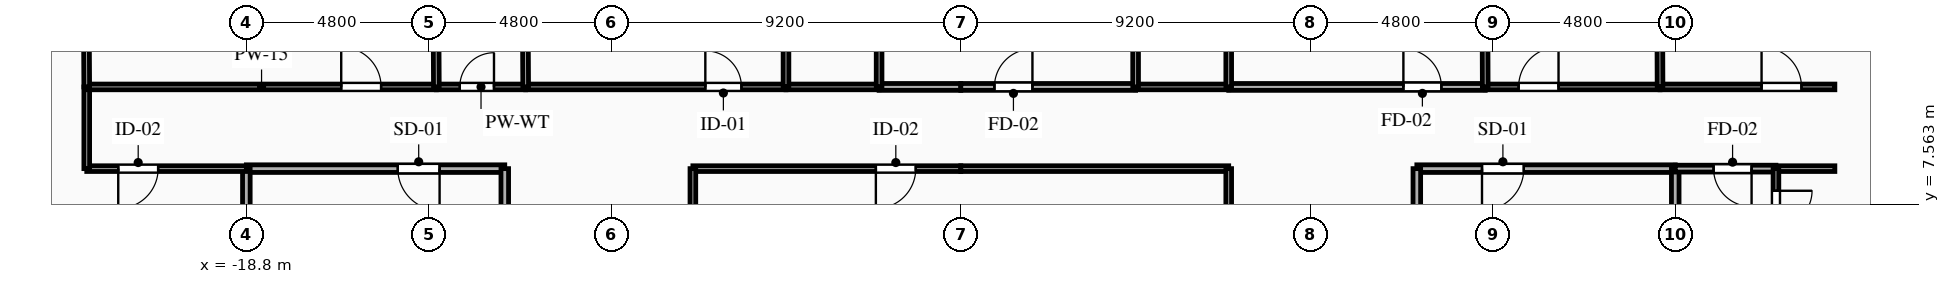
"""IFC4 building model, lengths in metres.
Left out: names, types, materials, properties, quantities, classifications, styles, units other than length and angle.
Written with IfcOpenShell. Run it as: python <this file> out.ifc"""

import sys

from ifc_helpers import new_model, si_unit, direction, frame, frame_2d, origin, place, context, subcontext, project, spatial, rectangle, extrude, element, fill, save


model = new_model("IFC4")
c1 = context("Model", 3, precision=1e-05, world=origin(), true_north=direction((0.0, 1.0)))
c2 = subcontext(c1, "Body", "Model", "MODEL_VIEW")
j1 = project(units=[si_unit("LENGTHUNIT", "METRE"), si_unit("PLANEANGLEUNIT", "RADIAN")], contexts=[c1])
p1 = place(None, origin())
s1 = spatial("IfcSite", under=j1, at=p1, CompositionType="ELEMENT")
p2 = place(p1, origin())
s2 = spatial("IfcBuilding", under=s1, at=p2, CompositionType="ELEMENT")
p3 = place(p2, frame((0.0, 0.0, 79.0)))
s3 = spatial("IfcBuildingStorey", under=s2, at=p3, CompositionType="ELEMENT", Elevation=79.0)
p4 = place(p3, frame((-12.0, 8.5, 0.0), z_axis=(0.0, 0.0, 1.0), x_axis=(-1.0, 0.0, 0.0)))
e1 = element("IfcWall", 1, at=p4, inside=s3, PredefinedType="PARTITIONING", context=c2, shape_type="SweptSolid", body=[
    extrude(rectangle(XDim=6.8, YDim=0.2, at=frame_2d((3.4, 0.0))), origin(), (0.0, 0.0, 1.0), 3.045),
])
p5 = place(p4, frame((1.715, 0.0, 0.0)))
e2 = element("IfcOpeningElement", 2, at=p5, cuts=e1, PredefinedType="OPENING", context=c2, shape_type="SweptSolid", body=[
    extrude(rectangle(XDim=1.1, YDim=2.15, at=frame_2d((0.55, 1.075))), frame((0.0, 0.11, 0.0), z_axis=(0.0, -1.0, 0.0), x_axis=(1.0, 0.0, 0.0)), (0.0, 0.0, 1.0), 0.22),
])
p6 = place(p3, frame((-12.0, 5.6, 0.0), z_axis=(0.0, 0.0, 1.0), x_axis=(0.0, 1.0, 0.0)))
e3 = element("IfcWall", 3, at=p6, inside=s3, PredefinedType="PARTITIONING", context=c2, shape_type="SweptSolid", body=[
    extrude(rectangle(XDim=2.9, YDim=0.2, at=frame_2d((1.45, 0.0))), origin(), (0.0, 0.0, 1.0), 3.045),
])
p7 = place(p3, frame((-18.8, 8.5, 0.0), z_axis=(0.0, 0.0, 1.0), x_axis=(0.0, -1.0, 0.0)))
e4 = element("IfcWall", 4, at=p7, inside=s3, PredefinedType="PARTITIONING", context=c2, shape_type="SweptSolid", body=[
    extrude(rectangle(XDim=2.9, YDim=0.2, at=frame_2d((1.45, 0.0))), origin(), (0.0, 0.0, 1.0), 2.53),
])
p8 = place(p3, frame((18.8, 8.5, 0.0), z_axis=(0.0, 0.0, 1.0), x_axis=(-1.0, 0.0, 0.0)))
e5 = element("IfcWall", 5, at=p8, inside=s3, PredefinedType="PARTITIONING", context=c2, shape_type="SweptSolid", body=[
    extrude(rectangle(XDim=6.8, YDim=0.2, at=frame_2d((3.4, 0.0))), origin(), (0.0, 0.0, 1.0), 3.045),
])
p9 = place(p8, frame((3.985, 0.0, 0.0)))
e6 = element("IfcOpeningElement", 6, at=p9, cuts=e5, PredefinedType="OPENING", context=c2, shape_type="SweptSolid", body=[
    extrude(rectangle(XDim=1.1, YDim=2.15, at=frame_2d((0.55, 1.075))), frame((0.0, 0.11, 0.0), z_axis=(0.0, -1.0, 0.0), x_axis=(1.0, 0.0, 0.0)), (0.0, 0.0, 1.0), 0.22),
])
p10 = place(p3, frame((12.0, 8.5, 0.0), z_axis=(0.0, 0.0, 1.0), x_axis=(0.0, -1.0, 0.0)))
e7 = element("IfcWall", 7, at=p10, inside=s3, PredefinedType="PARTITIONING", context=c2, shape_type="SweptSolid", body=[
    extrude(rectangle(XDim=2.9, YDim=0.2, at=frame_2d((1.45, 0.0))), origin(), (0.0, 0.0, 1.0), 3.045),
])
p11 = place(p3, frame((18.8, 5.6, 0.0), z_axis=(0.0, 0.0, 1.0), x_axis=(0.0, 1.0, 0.0)))
e8 = element("IfcWall", 8, at=p11, inside=s3, PredefinedType="PARTITIONING", context=c2, shape_type="SweptSolid", body=[
    extrude(rectangle(XDim=2.9, YDim=0.2, at=frame_2d((1.45, 0.0))), origin(), (0.0, 0.0, 1.0), 2.53),
])
p12 = place(p3, frame((-18.8, 8.5, 0.0), z_axis=(0.0, 0.0, 1.0), x_axis=(-1.0, 0.0, 0.0)))
e9 = element("IfcWall", 9, at=p12, inside=s3, PredefinedType="PARTITIONING", context=c2, shape_type="SweptSolid", body=[
    extrude(rectangle(XDim=4.2, YDim=0.15, at=frame_2d((2.1, 0.0))), origin(), (0.0, 0.0, 1.0), 3.045),
])
p13 = place(p12, frame((2.321, 0.0, 0.0)))
e10 = element("IfcOpeningElement", 10, at=p13, cuts=e9, PredefinedType="OPENING", context=c2, shape_type="SweptSolid", body=[
    extrude(rectangle(XDim=1.05, YDim=2.15, at=frame_2d((0.525, 1.075))), frame((0.0, 0.085, 0.0), z_axis=(0.0, -1.0, 0.0), x_axis=(1.0, 0.0, 0.0)), (0.0, 0.0, 1.0), 0.17),
])
p14 = place(p3, frame((-23.0, 8.5, 0.0), z_axis=(0.0, 0.0, 1.0), x_axis=(0.0, 1.0, 0.0)))
e11 = element("IfcWall", 11, at=p14, inside=s3, PredefinedType="PARTITIONING", context=c2, shape_type="SweptSolid", body=[
    extrude(rectangle(XDim=2.15, YDim=0.15, at=frame_2d((1.075, 0.0))), origin(), (0.0, 0.0, 1.0), 3.045),
])
p15 = place(p3, frame((-23.0, 10.65, 0.0), z_axis=(0.0, 0.0, 1.0), x_axis=(1.0, 0.0, 0.0)))
e12 = element("IfcWall", 12, at=p15, inside=s3, PredefinedType="PARTITIONING", context=c2, shape_type="SweptSolid", body=[
    extrude(rectangle(XDim=9.2, YDim=0.15, at=frame_2d((4.6, 0.0))), origin(), (0.0, 0.0, 1.0), 3.045),
])
p16 = place(p15, frame((6.696, 0.0, 0.0)))
e13 = element("IfcOpeningElement", 13, at=p16, cuts=e12, PredefinedType="OPENING", context=c2, shape_type="SweptSolid", body=[
    extrude(rectangle(XDim=1.05, YDim=2.15, at=frame_2d((0.525, 1.075))), frame((0.0, 0.085, 0.0), z_axis=(0.0, -1.0, 0.0), x_axis=(1.0, 0.0, 0.0)), (0.0, 0.0, 1.0), 0.17),
])
p17 = place(p3, frame((-13.8, 10.65, 0.0), z_axis=(0.0, 0.0, 1.0), x_axis=(1.0, 0.0, 0.0)))
e14 = element("IfcWall", 14, at=p17, inside=s3, PredefinedType="PLUMBINGWALL", context=c2, shape_type="SweptSolid", body=[
    extrude(rectangle(XDim=2.35, YDim=0.15, at=frame_2d((1.175, 0.0))), origin(), (0.0, 0.0, 1.0), 3.045),
])
p18 = place(p17, frame((0.616, 0.0, 0.0)))
e15 = element("IfcOpeningElement", 15, at=p18, cuts=e14, PredefinedType="OPENING", context=c2, shape_type="SweptSolid", body=[
    extrude(rectangle(XDim=0.9, YDim=2.1, at=frame_2d((0.45, 1.05))), frame((0.0, 0.085, 0.0), z_axis=(0.0, -1.0, 0.0), x_axis=(1.0, 0.0, 0.0)), (0.0, 0.0, 1.0), 0.17),
])
p19 = place(p3, frame((-11.45, 10.65, 0.0), z_axis=(0.0, 0.0, 1.0), x_axis=(1.0, 0.0, 0.0)))
e16 = element("IfcWall", 16, at=p19, inside=s3, PredefinedType="PARTITIONING", context=c2, shape_type="SweptSolid", body=[
    extrude(rectangle(XDim=6.85, YDim=0.15, at=frame_2d((3.425, 0.0))), origin(), (0.0, 0.0, 1.0), 3.045),
])
p20 = place(p19, frame((4.728, 0.0, 0.0)))
e17 = element("IfcOpeningElement", 17, at=p20, cuts=e16, PredefinedType="OPENING", context=c2, shape_type="SweptSolid", body=[
    extrude(rectangle(XDim=0.95, YDim=2.1, at=frame_2d((0.475, 1.05))), frame((0.0, 0.085, 0.0), z_axis=(0.0, -1.0, 0.0), x_axis=(1.0, 0.0, 0.0)), (0.0, 0.0, 1.0), 0.17),
])
p21 = place(p3, frame((-2.15, 10.65, 0.0), z_axis=(0.0, 0.0, 1.0), x_axis=(1.0, 0.0, 0.0)))
e18 = element("IfcWall", 18, at=p21, inside=s3, PredefinedType="PARTITIONING", context=c2, shape_type="SweptSolid", body=[
    extrude(rectangle(XDim=2.15, YDim=0.18, at=frame_2d((1.075, 0.0))), origin(), (0.0, 0.0, 1.0), 3.045),
])
p22 = place(p3, frame((-4.6, 10.65, 0.0), z_axis=(0.0, 0.0, 1.0), x_axis=(1.0, 0.0, 0.0)))
e19 = element("IfcWall", 19, at=p22, inside=s3, PredefinedType="PLUMBINGWALL", context=c2, shape_type="SweptSolid", body=[
    extrude(rectangle(XDim=2.45, YDim=0.15, at=frame_2d((1.225, 0.0))), origin(), (0.0, 0.0, 1.0), 3.045),
])
p23 = place(p3, frame((0.0, 8.5, 0.0), z_axis=(0.0, 0.0, 1.0), x_axis=(-1.0, 0.0, 0.0)))
e20 = element("IfcWall", 20, at=p23, inside=s3, PredefinedType="PARTITIONING", context=c2, shape_type="SweptSolid", body=[
    extrude(rectangle(XDim=7.05, YDim=0.15, at=frame_2d((3.525, 0.0))), origin(), (0.0, 0.0, 1.0), 3.045),
])
p24 = place(p23, frame((1.185, 0.0, 0.0)))
e21 = element("IfcOpeningElement", 21, at=p24, cuts=e20, PredefinedType="OPENING", context=c2, shape_type="SweptSolid", body=[
    extrude(rectangle(XDim=1.05, YDim=2.15, at=frame_2d((0.525, 1.075))), frame((0.0, 0.085, 0.0), z_axis=(0.0, -1.0, 0.0), x_axis=(1.0, 0.0, 0.0)), (0.0, 0.0, 1.0), 0.17),
])
p25 = place(p3, frame((21.45, 8.5, 0.0), z_axis=(0.0, 0.0, 1.0), x_axis=(-1.0, 0.0, 0.0)))
e22 = element("IfcWall", 22, at=p25, inside=s3, PredefinedType="PARTITIONING", context=c2, shape_type="SweptSolid", body=[
    extrude(rectangle(XDim=2.65, YDim=0.18, at=frame_2d((1.325, 0.0))), origin(), (0.0, 0.0, 1.0), 3.045),
])
p26 = place(p25, frame((0.641, 0.0, 0.0)))
e23 = element("IfcOpeningElement", 23, at=p26, cuts=e22, PredefinedType="OPENING", context=c2, shape_type="SweptSolid", body=[
    extrude(rectangle(XDim=1.0, YDim=2.15, at=frame_2d((0.5, 1.075))), frame((0.0, 0.1, 0.0), z_axis=(0.0, -1.0, 0.0), x_axis=(1.0, 0.0, 0.0)), (0.0, 0.0, 1.0), 0.2),
])
p27 = place(p3, frame((23.0, 8.5, 0.0), z_axis=(0.0, 0.0, 1.0), x_axis=(-1.0, 0.0, 0.0)))
e24 = element("IfcWall", 24, at=p27, inside=s3, PredefinedType="PARTITIONING", context=c2, shape_type="SweptSolid", body=[
    extrude(rectangle(XDim=1.55, YDim=0.15, at=frame_2d((0.775, 0.0))), origin(), (0.0, 0.0, 1.0), 3.045),
])
p28 = place(p3, frame((0.0, 10.65, 0.0), z_axis=(0.0, 0.0, 1.0), x_axis=(1.0, 0.0, 0.0)))
e25 = element("IfcWall", 25, at=p28, inside=s3, PredefinedType="PARTITIONING", context=c2, shape_type="SweptSolid", body=[
    extrude(rectangle(XDim=4.6, YDim=0.18, at=frame_2d((2.3, 0.0))), origin(), (0.0, 0.0, 1.0), 3.045),
])
p29 = place(p28, frame((0.885, 0.0, 0.0)))
e26 = element("IfcOpeningElement", 26, at=p29, cuts=e25, PredefinedType="OPENING", context=c2, shape_type="SweptSolid", body=[
    extrude(rectangle(XDim=1.0, YDim=2.15, at=frame_2d((0.5, 1.075))), frame((0.0, 0.1, 0.0), z_axis=(0.0, -1.0, 0.0), x_axis=(1.0, 0.0, 0.0)), (0.0, 0.0, 1.0), 0.2),
])
p30 = place(p3, frame((7.05, 10.65, 0.0), z_axis=(0.0, 0.0, 1.0), x_axis=(1.0, 0.0, 0.0)))
e27 = element("IfcWall", 27, at=p30, inside=s3, PredefinedType="PARTITIONING", context=c2, shape_type="SweptSolid", body=[
    extrude(rectangle(XDim=6.75, YDim=0.18, at=frame_2d((3.375, 0.0))), origin(), (0.0, 0.0, 1.0), 3.045),
])
p31 = place(p30, frame((4.596, 0.0, 0.0)))
e28 = element("IfcOpeningElement", 28, at=p31, cuts=e27, PredefinedType="OPENING", context=c2, shape_type="SweptSolid", body=[
    extrude(rectangle(XDim=1.0, YDim=2.15, at=frame_2d((0.5, 1.075))), frame((0.0, 0.1, 0.0), z_axis=(0.0, -1.0, 0.0), x_axis=(1.0, 0.0, 0.0)), (0.0, 0.0, 1.0), 0.2),
])
p32 = place(p3, frame((4.6, 10.65, 0.0), z_axis=(0.0, 0.0, 1.0), x_axis=(1.0, 0.0, 0.0)))
e29 = element("IfcWall", 29, at=p32, inside=s3, PredefinedType="PLUMBINGWALL", context=c2, shape_type="SweptSolid", body=[
    extrude(rectangle(XDim=2.45, YDim=0.15, at=frame_2d((1.225, 0.0))), origin(), (0.0, 0.0, 1.0), 3.045),
])
p33 = place(p3, frame((13.8, 10.65, 0.0), z_axis=(0.0, 0.0, 1.0), x_axis=(1.0, 0.0, 0.0)))
e30 = element("IfcWall", 30, at=p33, inside=s3, PredefinedType="PARTITIONING", context=c2, shape_type="SweptSolid", body=[
    extrude(rectangle(XDim=4.6, YDim=0.15, at=frame_2d((2.3, 0.0))), origin(), (0.0, 0.0, 1.0), 3.045),
])
p34 = place(p33, frame((0.879, 0.0, 0.0)))
e31 = element("IfcOpeningElement", 31, at=p34, cuts=e30, PredefinedType="OPENING", context=c2, shape_type="SweptSolid", body=[
    extrude(rectangle(XDim=1.05, YDim=2.15, at=frame_2d((0.525, 1.075))), frame((0.0, 0.085, 0.0), z_axis=(0.0, -1.0, 0.0), x_axis=(1.0, 0.0, 0.0)), (0.0, 0.0, 1.0), 0.17),
])
p35 = place(p3, frame((18.4, 10.65, 0.0), z_axis=(0.0, 0.0, 1.0), x_axis=(1.0, 0.0, 0.0)))
e32 = element("IfcWall", 32, at=p35, inside=s3, PredefinedType="PARTITIONING", context=c2, shape_type="SweptSolid", body=[
    extrude(rectangle(XDim=4.6, YDim=0.15, at=frame_2d((2.3, 0.0))), origin(), (0.0, 0.0, 1.0), 3.045),
])
p36 = place(p35, frame((2.671, 0.0, 0.0)))
e33 = element("IfcOpeningElement", 33, at=p36, cuts=e32, PredefinedType="OPENING", context=c2, shape_type="SweptSolid", body=[
    extrude(rectangle(XDim=1.05, YDim=2.15, at=frame_2d((0.525, 1.075))), frame((0.0, 0.085, 0.0), z_axis=(0.0, -1.0, 0.0), x_axis=(1.0, 0.0, 0.0)), (0.0, 0.0, 1.0), 0.17),
])
for number, where, z_axis, x_axis in (
    (34, (7.05, 8.5, 0.0), (0.0, 0.0, 1.0), (-1.0, 0.0, 0.0)),
    (35, (-7.05, 8.5, 0.0), (0.0, 0.0, 1.0), (0.0, -1.0, 0.0)),
    (36, (7.05, 1.45, 0.0), (0.0, 0.0, 1.0), (0.0, 1.0, 0.0)),
):
    element("IfcWall", number, at=place(p3, frame(where, z_axis=z_axis, x_axis=x_axis)), inside=s3, PredefinedType="PARTITIONING", context=c2, shape_type="SweptSolid", body=[
        extrude(rectangle(XDim=7.05, YDim=0.15, at=frame_2d((3.525, 0.0))), origin(), (0.0, 0.0, 1.0), 3.045),
    ])
p37 = place(p3, frame((-23.044, 18.013, 0.0), z_axis=(0.0, 0.0, 1.0), x_axis=(0.005968459246, -0.999982188588, 0.0)))
e37 = element("IfcWall", 37, at=p37, inside=s3, PredefinedType="PARTITIONING", context=c2, shape_type="SweptSolid", body=[
    extrude(rectangle(XDim=7.363, YDim=0.15, at=frame_2d((3.682, 0.0))), origin(), (0.0, 0.0, 1.0), 3.045),
])
p38 = place(p3, frame((21.45, 8.5, 0.0), z_axis=(0.0, 0.0, 1.0), x_axis=(0.0, -1.0, 0.0)))
e38 = element("IfcWall", 38, at=p38, inside=s3, PredefinedType="PARTITIONING", context=c2, shape_type="SweptSolid", body=[
    extrude(rectangle(XDim=2.115, YDim=0.15, at=frame_2d((1.058, 0.0))), origin(), (0.0, 0.0, 1.0), 3.045),
])
p39 = place(p38, frame((0.583, 0.0, 0.0)))
e39 = element("IfcOpeningElement", 39, at=p39, cuts=e38, PredefinedType="OPENING", context=c2, shape_type="SweptSolid", body=[
    extrude(rectangle(XDim=0.95, YDim=2.1, at=frame_2d((0.475, 1.05))), frame((0.0, 0.085, 0.0), z_axis=(0.0, -1.0, 0.0), x_axis=(1.0, 0.0, 0.0)), (0.0, 0.0, 1.0), 0.17),
])
p40 = place(p3, frame((-13.844, 18.98, 0.0), z_axis=(0.0, 0.0, 1.0), x_axis=(0.005275579446, -0.999986084034, 0.0)))
e40 = element("IfcWall", 40, at=p40, inside=s3, PredefinedType="PLUMBINGWALL", context=c2, shape_type="SweptSolid", body=[
    extrude(rectangle(XDim=8.33, YDim=0.15, at=frame_2d((4.165, 0.0))), origin(), (0.0, 0.0, 1.0), 3.045),
])
p41 = place(p3, frame((-11.494, 19.227, 0.0), z_axis=(0.0, 0.0, 1.0), x_axis=(0.005123612688, -0.99998687421, 0.0)))
e41 = element("IfcWall", 41, at=p41, inside=s3, PredefinedType="PLUMBINGWALL", context=c2, shape_type="SweptSolid", body=[
    extrude(rectangle(XDim=8.577, YDim=0.15, at=frame_2d((4.289, 0.0))), origin(), (0.0, 0.0, 1.0), 3.045),
])
for number, where, z_axis, x_axis in (
    (42, (-4.6, 12.8, 0.0), (0.0, 0.0, 1.0), (0.0, -1.0, 0.0)),
    (43, (-2.15, 10.65, 0.0), (0.0, 0.0, 1.0), (0.0, 1.0, 0.0)),
    (44, (4.6, 12.8, 0.0), (0.0, 0.0, 1.0), (0.0, -1.0, 0.0)),
    (45, (7.05, 10.65, 0.0), (0.0, 0.0, 1.0), (0.0, 1.0, 0.0)),
):
    element("IfcWall", number, at=place(p3, frame(where, z_axis=z_axis, x_axis=x_axis)), inside=s3, PredefinedType="PLUMBINGWALL", context=c2, shape_type="SweptSolid", body=[
        extrude(rectangle(XDim=2.15, YDim=0.15, at=frame_2d((1.075, 0.0))), origin(), (0.0, 0.0, 1.0), 3.045),
    ])
p42 = place(p3, frame((13.756, 21.881, 0.0), z_axis=(0.0, 0.0, 1.0), x_axis=(0.003912928458, -0.999992344466, 0.0)))
e46 = element("IfcWall", 46, at=p42, inside=s3, PredefinedType="PARTITIONING", context=c2, shape_type="SweptSolid", body=[
    extrude(rectangle(XDim=11.231, YDim=0.15, at=frame_2d((5.615, 0.0))), origin(), (0.0, 0.0, 1.0), 3.045),
])
p43 = place(p3, frame((18.356, 22.364, 0.0), z_axis=(0.0, 0.0, 1.0), x_axis=(0.003730617419, -0.999993041223, 0.0)))
e47 = element("IfcWall", 47, at=p43, inside=s3, PredefinedType="PARTITIONING", context=c2, shape_type="SweptSolid", body=[
    extrude(rectangle(XDim=11.714, YDim=0.15, at=frame_2d((5.857, 0.0))), origin(), (0.0, 0.0, 1.0), 2.53),
])
p44 = place(p5, origin())
e48 = element("IfcDoor", 48, at=p44, inside=s3, OperationType="SINGLE_SWING_LEFT", PredefinedType="DOOR", context=c2, shape_type="SweptSolid", body=[
    extrude(rectangle(XDim=1.1, YDim=2.15, at=frame_2d((0.55, 1.075))), frame((0.0, 0.025, 0.0), z_axis=(0.0, -1.0, 0.0), x_axis=(1.0, 0.0, 0.0)), (0.0, 0.0, 1.0), 0.05),
])
fill(e2, e48)
p45 = place(p9, origin())
e49 = element("IfcDoor", 49, at=p45, inside=s3, OperationType="SINGLE_SWING_RIGHT", PredefinedType="DOOR", context=c2, shape_type="SweptSolid", body=[
    extrude(rectangle(XDim=1.1, YDim=2.15, at=frame_2d((0.55, 1.075))), frame((0.0, 0.025, 0.0), z_axis=(0.0, -1.0, 0.0), x_axis=(1.0, 0.0, 0.0)), (0.0, 0.0, 1.0), 0.05),
])
fill(e6, e49)
p46 = place(p13, origin())
e50 = element("IfcDoor", 50, at=p46, inside=s3, OperationType="SINGLE_SWING_RIGHT", PredefinedType="DOOR", context=c2, shape_type="SweptSolid", body=[
    extrude(rectangle(XDim=1.05, YDim=2.15, at=frame_2d((0.525, 1.075))), frame((0.0, 0.025, 0.0), z_axis=(0.0, -1.0, 0.0), x_axis=(1.0, 0.0, 0.0)), (0.0, 0.0, 1.0), 0.05),
])
fill(e10, e50)
p47 = place(p16, origin())
e51 = element("IfcDoor", 51, at=p47, inside=s3, OperationType="SINGLE_SWING_LEFT", PredefinedType="DOOR", context=c2, shape_type="SweptSolid", body=[
    extrude(rectangle(XDim=1.05, YDim=2.15, at=frame_2d((0.525, 1.075))), frame((0.0, 0.025, 0.0), z_axis=(0.0, -1.0, 0.0), x_axis=(1.0, 0.0, 0.0)), (0.0, 0.0, 1.0), 0.05),
])
fill(e13, e51)
p48 = place(p18, origin())
e52 = element("IfcDoor", 52, at=p48, inside=s3, OperationType="SINGLE_SWING_RIGHT", PredefinedType="DOOR", context=c2, shape_type="SweptSolid", body=[
    extrude(rectangle(XDim=0.9, YDim=2.1, at=frame_2d((0.45, 1.05))), frame((0.0, 0.025, 0.0), z_axis=(0.0, -1.0, 0.0), x_axis=(1.0, 0.0, 0.0)), (0.0, 0.0, 1.0), 0.05),
])
fill(e15, e52)
p49 = place(p20, origin())
e53 = element("IfcDoor", 53, at=p49, inside=s3, OperationType="SINGLE_SWING_LEFT", PredefinedType="DOOR", context=c2, shape_type="SweptSolid", body=[
    extrude(rectangle(XDim=0.95, YDim=2.1, at=frame_2d((0.475, 1.05))), frame((0.0, 0.025, 0.0), z_axis=(0.0, -1.0, 0.0), x_axis=(1.0, 0.0, 0.0)), (0.0, 0.0, 1.0), 0.05),
])
fill(e17, e53)
p50 = place(p24, origin())
e54 = element("IfcDoor", 54, at=p50, inside=s3, OperationType="SINGLE_SWING_RIGHT", PredefinedType="DOOR", context=c2, shape_type="SweptSolid", body=[
    extrude(rectangle(XDim=1.05, YDim=2.15, at=frame_2d((0.525, 1.075))), frame((0.0, 0.025, 0.0), z_axis=(0.0, -1.0, 0.0), x_axis=(1.0, 0.0, 0.0)), (0.0, 0.0, 1.0), 0.05),
])
fill(e21, e54)
p51 = place(p26, origin())
e55 = element("IfcDoor", 55, at=p51, inside=s3, OperationType="SINGLE_SWING_LEFT", PredefinedType="DOOR", context=c2, shape_type="SweptSolid", body=[
    extrude(rectangle(XDim=1.0, YDim=2.15, at=frame_2d((0.5, 1.075))), frame((0.0, 0.025, 0.0), z_axis=(0.0, -1.0, 0.0), x_axis=(1.0, 0.0, 0.0)), (0.0, 0.0, 1.0), 0.05),
])
fill(e23, e55)
p52 = place(p29, origin())
e56 = element("IfcDoor", 56, at=p52, inside=s3, OperationType="SINGLE_SWING_RIGHT", PredefinedType="DOOR", context=c2, shape_type="SweptSolid", body=[
    extrude(rectangle(XDim=1.0, YDim=2.15, at=frame_2d((0.5, 1.075))), frame((0.0, 0.025, 0.0), z_axis=(0.0, -1.0, 0.0), x_axis=(1.0, 0.0, 0.0)), (0.0, 0.0, 1.0), 0.05),
])
fill(e26, e56)
p53 = place(p31, origin())
e57 = element("IfcDoor", 57, at=p53, inside=s3, OperationType="SINGLE_SWING_LEFT", PredefinedType="DOOR", context=c2, shape_type="SweptSolid", body=[
    extrude(rectangle(XDim=1.0, YDim=2.15, at=frame_2d((0.5, 1.075))), frame((0.0, 0.025, 0.0), z_axis=(0.0, -1.0, 0.0), x_axis=(1.0, 0.0, 0.0)), (0.0, 0.0, 1.0), 0.05),
])
fill(e28, e57)
p54 = place(p34, origin())
e58 = element("IfcDoor", 58, at=p54, inside=s3, OperationType="SINGLE_SWING_RIGHT", PredefinedType="DOOR", context=c2, shape_type="SweptSolid", body=[
    extrude(rectangle(XDim=1.05, YDim=2.15, at=frame_2d((0.525, 1.075))), frame((0.0, 0.025, 0.0), z_axis=(0.0, -1.0, 0.0), x_axis=(1.0, 0.0, 0.0)), (0.0, 0.0, 1.0), 0.05),
])
fill(e31, e58)
p55 = place(p36, origin())
e59 = element("IfcDoor", 59, at=p55, inside=s3, OperationType="SINGLE_SWING_LEFT", PredefinedType="DOOR", context=c2, shape_type="SweptSolid", body=[
    extrude(rectangle(XDim=1.05, YDim=2.15, at=frame_2d((0.525, 1.075))), frame((0.0, 0.025, 0.0), z_axis=(0.0, -1.0, 0.0), x_axis=(1.0, 0.0, 0.0)), (0.0, 0.0, 1.0), 0.05),
])
fill(e33, e59)
p56 = place(p39, origin())
e60 = element("IfcDoor", 60, at=p56, inside=s3, OperationType="SINGLE_SWING_LEFT", PredefinedType="DOOR", context=c2, shape_type="SweptSolid", body=[
    extrude(rectangle(XDim=0.95, YDim=2.1, at=frame_2d((0.475, 1.05))), frame((0.0, 0.025, 0.0), z_axis=(0.0, -1.0, 0.0), x_axis=(1.0, 0.0, 0.0)), (0.0, 0.0, 1.0), 0.05),
])
fill(e39, e60)
save(model, sys.argv[1])
